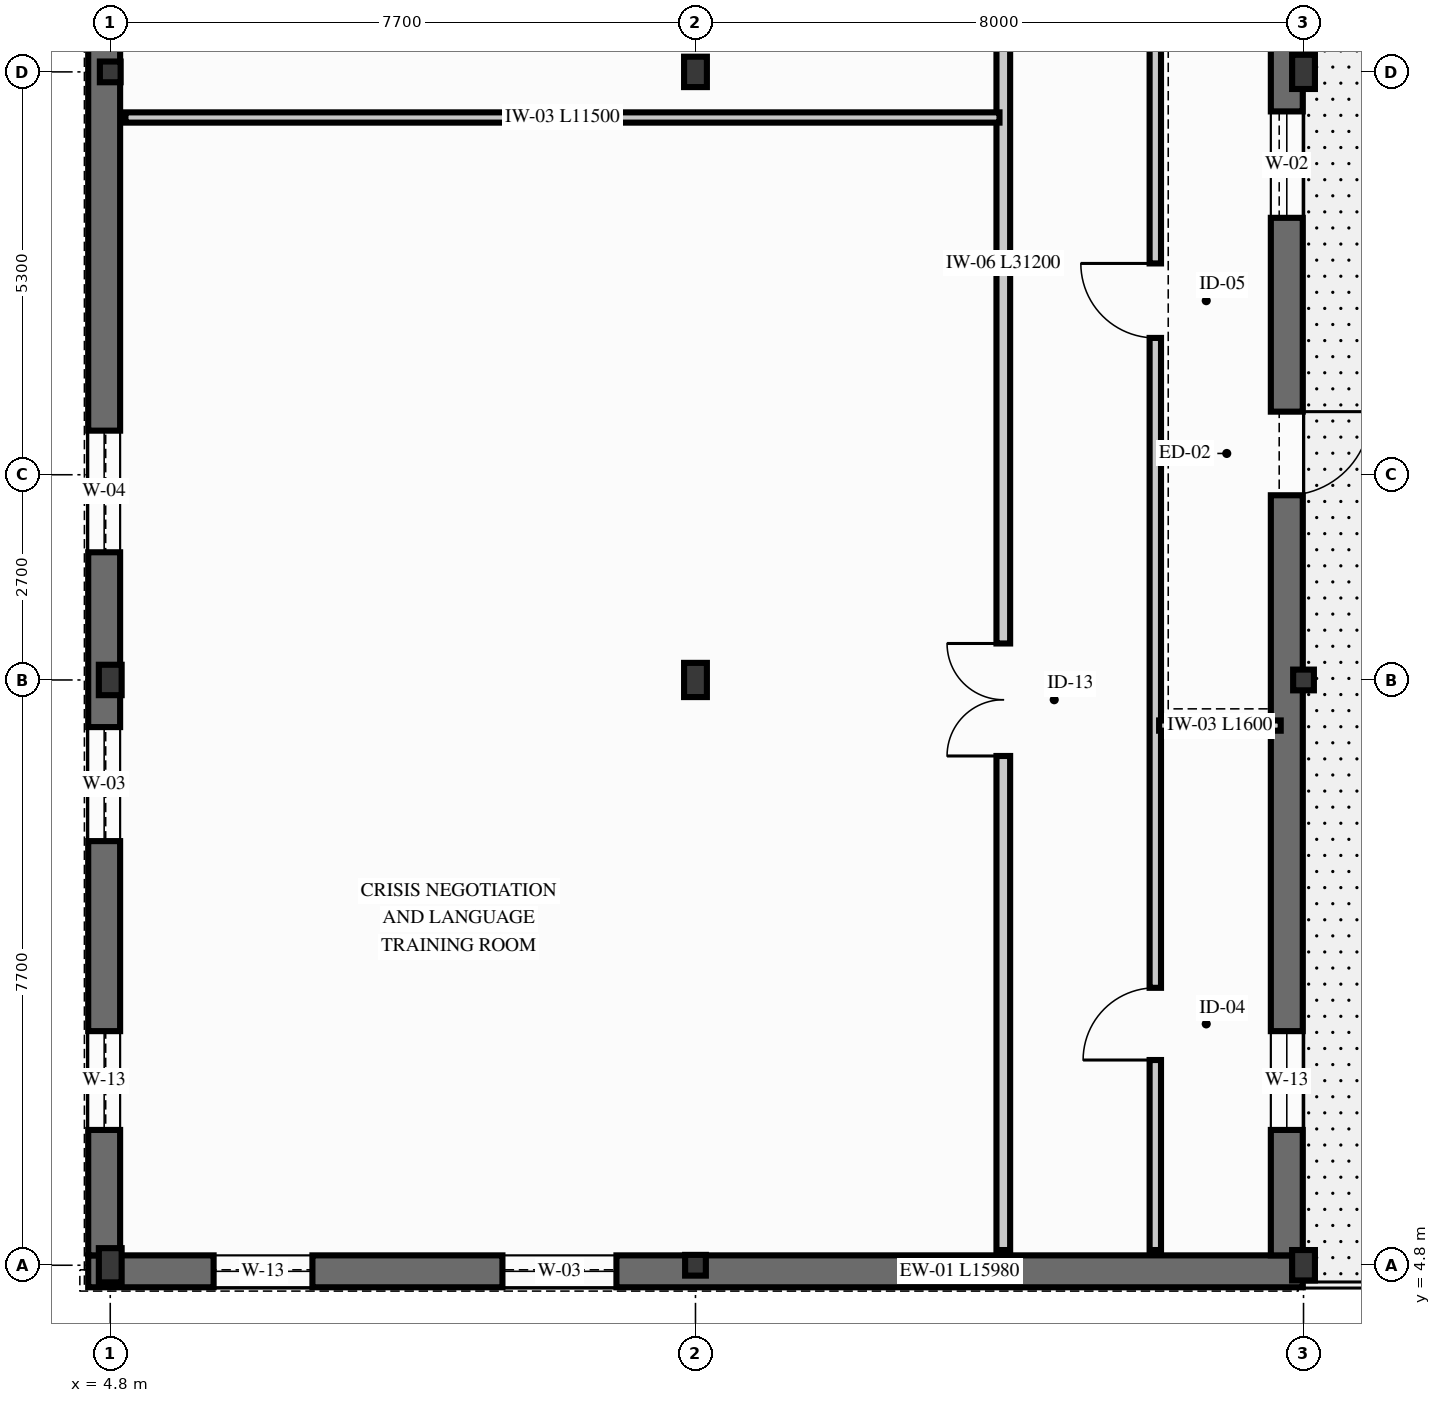
"""IFC4 building model, lengths in metres.
Left out: names, types, materials, properties, quantities, classifications, styles, units other than length and angle.
Written with IfcOpenShell. Run it as: python <this file> out.ifc"""

import sys

from ifc_helpers import new_model, si_unit, direction, frame, frame_2d, origin, origin_2d, place, context, subcontext, project, spatial, rectangle, hollow_circle, i_section, extrude, element, fill, save


model = new_model("IFC4")
c1 = context("Model", 3, precision=1e-05, world=origin(), true_north=direction((0.0, 1.0)))
c2 = subcontext(c1, "Body", "Model", "MODEL_VIEW")
j1 = project(units=[si_unit("LENGTHUNIT", "METRE"), si_unit("PLANEANGLEUNIT", "RADIAN")], contexts=[c1])
p1 = place(None, origin())
s1 = spatial("IfcSite", under=j1, at=p1, CompositionType="ELEMENT")
p2 = place(p1, origin())
s2 = spatial("IfcBuilding", under=s1, at=p2, CompositionType="ELEMENT")
p3 = place(p2, frame((0.0, 0.0, 13.5)))
s3 = spatial("IfcBuildingStorey", under=s2, at=p3, CompositionType="ELEMENT", Elevation=13.5)
p4 = place(p3, frame((4.8, 4.8, 0.0), z_axis=(0.0, 0.0, 1.0), x_axis=(1.0, 0.0, 0.0)))
e1 = element("IfcColumn", 1, at=p4, inside=s3, PredefinedType="COLUMN", context=c2, shape_type="SweptSolid", body=[
    extrude(i_section(OverallWidth=0.3, OverallDepth=0.45, WebThickness=0.014, FlangeThickness=0.026, FilletRadius=0.027, at=origin_2d()), origin(), (0.0, 0.0, 1.0), 3.94),
])
p5 = place(p3, frame((4.8, 12.5, 0.0), z_axis=(0.0, 0.0, 1.0), x_axis=(1.0, 0.0, 0.0)))
e2 = element("IfcColumn", 2, at=p5, inside=s3, PredefinedType="COLUMN", context=c2, shape_type="SweptSolid", body=[
    extrude(i_section(OverallWidth=0.3, OverallDepth=0.4, WebThickness=0.013, FlangeThickness=0.024, FilletRadius=0.027, at=origin_2d()), origin(), (0.0, 0.0, 1.0), 3.94),
])
for number, where, z_axis, x_axis in (
    (3, (4.8, 20.5, 0.0), (0.0, 0.0, 1.0), (1.0, 0.0, 0.0)),
    (4, (12.5, 4.8, 0.0), (0.0, 0.0, 1.0), (1.0, 0.0, 0.0)),
):
    element("IfcColumn", number, at=place(p3, frame(where, z_axis=z_axis, x_axis=x_axis)), inside=s3, PredefinedType="COLUMN", context=c2, shape_type="SweptSolid", body=[
        extrude(hollow_circle(Radius=0.136, WallThickness=0.012, at=origin_2d()), origin(), (0.0, 0.0, 1.0), 3.94),
    ])
p6 = place(p3, frame((12.5, 12.5, 0.0), z_axis=(0.0, 0.0, 1.0), x_axis=(1.0, 0.0, 0.0)))
e5 = element("IfcColumn", 5, at=p6, inside=s3, PredefinedType="COLUMN", context=c2, shape_type="SweptSolid", body=[
    extrude(i_section(OverallWidth=0.3, OverallDepth=0.45, WebThickness=0.014, FlangeThickness=0.026, FilletRadius=0.027, at=origin_2d()), origin(), (0.0, 0.0, 1.0), 3.94),
])
for number, where, z_axis, x_axis in (
    (6, (12.5, 20.5, 0.0), (0.0, 0.0, 1.0), (1.0, 0.0, 0.0)),
    (7, (20.5, 4.8, 0.0), (0.0, 0.0, 1.0), (1.0, 0.0, 0.0)),
):
    element("IfcColumn", number, at=place(p3, frame(where, z_axis=z_axis, x_axis=x_axis)), inside=s3, PredefinedType="COLUMN", context=c2, shape_type="SweptSolid", body=[
        extrude(i_section(OverallWidth=0.3, OverallDepth=0.4, WebThickness=0.013, FlangeThickness=0.024, FilletRadius=0.027, at=origin_2d()), origin(), (0.0, 0.0, 1.0), 3.94),
    ])
p7 = place(p3, frame((20.5, 12.5, 0.0), z_axis=(0.0, 0.0, 1.0), x_axis=(1.0, 0.0, 0.0)))
e8 = element("IfcColumn", 8, at=p7, inside=s3, PredefinedType="COLUMN", context=c2, shape_type="SweptSolid", body=[
    extrude(hollow_circle(Radius=0.136, WallThickness=0.012, at=origin_2d()), origin(), (0.0, 0.0, 1.0), 3.94),
])
p8 = place(p3, frame((20.5, 20.5, 0.0), z_axis=(0.0, 0.0, 1.0), x_axis=(1.0, 0.0, 0.0)))
e9 = element("IfcColumn", 9, at=p8, inside=s3, PredefinedType="COLUMN", context=c2, shape_type="SweptSolid", body=[
    extrude(i_section(OverallWidth=0.3, OverallDepth=0.45, WebThickness=0.014, FlangeThickness=0.026, FilletRadius=0.027, at=origin_2d()), origin(), (0.0, 0.0, 1.0), 3.94),
])
p9 = place(p3, frame((4.51, 4.72, 0.0), z_axis=(0.0, 0.0, 1.0), x_axis=(1.0, 0.0, 0.0)))
e10 = element("IfcWall", 10, at=p9, inside=s3, PredefinedType="SOLIDWALL", context=c2, shape_type="SweptSolid", body=[
    extrude(rectangle(XDim=15.98, YDim=0.42, at=frame_2d((7.99, 0.0))), origin(), (0.0, 0.0, 1.0), 3.9),
])
p10 = place(p9, frame((1.65, 0.0, 0.85)))
e11 = element("IfcOpeningElement", 11, at=p10, cuts=e10, PredefinedType="OPENING", context=c2, shape_type="SweptSolid", body=[
    extrude(rectangle(XDim=1.3, YDim=2.15, at=frame_2d((0.65, 1.075))), frame((0.0, 0.22, 0.0), z_axis=(0.0, -1.0, 0.0), x_axis=(1.0, 0.0, 0.0)), (0.0, 0.0, 1.0), 0.44),
])
p11 = place(p9, frame((5.45, 0.0, 0.85)))
e12 = element("IfcOpeningElement", 12, at=p11, cuts=e10, PredefinedType="OPENING", context=c2, shape_type="SweptSolid", body=[
    extrude(rectangle(XDim=1.5, YDim=2.3, at=frame_2d((0.75, 1.15))), frame((0.0, 0.22, 0.0), z_axis=(0.0, -1.0, 0.0), x_axis=(1.0, 0.0, 0.0)), (0.0, 0.0, 1.0), 0.44),
])
p12 = place(p3, frame((4.72, 4.93, 0.0), z_axis=(0.0, 0.0, 1.0), x_axis=(0.0, 1.0, 0.0)))
e13 = element("IfcWall", 13, at=p12, inside=s3, PredefinedType="SOLIDWALL", context=c2, shape_type="SweptSolid", body=[
    extrude(rectangle(XDim=31.57, YDim=0.42, at=frame_2d((15.785, 0.0))), origin(), (0.0, 0.0, 1.0), 3.9),
])
p13 = place(p12, frame((1.65, 0.0, 0.85)))
e14 = element("IfcOpeningElement", 14, at=p13, cuts=e13, PredefinedType="OPENING", context=c2, shape_type="SweptSolid", body=[
    extrude(rectangle(XDim=1.3, YDim=2.15, at=frame_2d((0.65, 1.075))), frame((0.0, 0.22, 0.0), z_axis=(0.0, -1.0, 0.0), x_axis=(1.0, 0.0, 0.0)), (0.0, 0.0, 1.0), 0.44),
])
p14 = place(p12, frame((5.45, 0.0, 0.85)))
e15 = element("IfcOpeningElement", 15, at=p14, cuts=e13, PredefinedType="OPENING", context=c2, shape_type="SweptSolid", body=[
    extrude(rectangle(XDim=1.5, YDim=2.3, at=frame_2d((0.75, 1.15))), frame((0.0, 0.22, 0.0), z_axis=(0.0, -1.0, 0.0), x_axis=(1.0, 0.0, 0.0)), (0.0, 0.0, 1.0), 0.44),
])
p15 = place(p12, frame((9.25, 0.0, 0.85)))
e16 = element("IfcOpeningElement", 16, at=p15, cuts=e13, PredefinedType="OPENING", context=c2, shape_type="SweptSolid", body=[
    extrude(rectangle(XDim=1.6, YDim=2.4, at=frame_2d((0.8, 1.2))), frame((0.0, 0.22, 0.0), z_axis=(0.0, -1.0, 0.0), x_axis=(1.0, 0.0, 0.0)), (0.0, 0.0, 1.0), 0.44),
])
p16 = place(p12, frame((16.85, 0.0, 0.85)))
e17 = element("IfcOpeningElement", 17, at=p16, cuts=e13, PredefinedType="OPENING", context=c2, shape_type="SweptSolid", body=[
    extrude(rectangle(XDim=1.7, YDim=2.35, at=frame_2d((0.85, 1.175))), frame((0.0, 0.22, 0.0), z_axis=(0.0, -1.0, 0.0), x_axis=(1.0, 0.0, 0.0)), (0.0, 0.0, 1.0), 0.44),
])
p17 = place(p12, frame((20.65, 0.0, 0.85)))
e18 = element("IfcOpeningElement", 18, at=p17, cuts=e13, PredefinedType="OPENING", context=c2, shape_type="SweptSolid", body=[
    extrude(rectangle(XDim=1.8, YDim=2.4, at=frame_2d((0.9, 1.2))), frame((0.0, 0.22, 0.0), z_axis=(0.0, -1.0, 0.0), x_axis=(1.0, 0.0, 0.0)), (0.0, 0.0, 1.0), 0.44),
])
p18 = place(p3, frame((20.28, 4.93, 0.0), z_axis=(0.0, 0.0, 1.0), x_axis=(0.0, 1.0, 0.0)))
e19 = element("IfcWall", 19, at=p18, inside=s3, PredefinedType="SOLIDWALL", context=c2, shape_type="SweptSolid", body=[
    extrude(rectangle(XDim=31.57, YDim=0.42, at=frame_2d((15.785, 0.0))), origin(), (0.0, 0.0, 1.0), 3.9),
])
p19 = place(p18, frame((11.1, 0.0, 0.0), z_axis=(0.0, 0.0, 1.0), x_axis=(-1.0, 0.0, 0.0)))
e20 = element("IfcOpeningElement", 20, at=p19, cuts=e19, PredefinedType="OPENING", context=c2, shape_type="SweptSolid", body=[
    extrude(rectangle(XDim=1.1, YDim=2.25, at=frame_2d((0.55, 1.125))), frame((0.0, 0.22, 0.0), z_axis=(0.0, -1.0, 0.0), x_axis=(1.0, 0.0, 0.0)), (0.0, 0.0, 1.0), 0.44),
])
p20 = place(p18, frame((21.1, 0.0, 0.0), z_axis=(0.0, 0.0, 1.0), x_axis=(-1.0, 0.0, 0.0)))
e21 = element("IfcOpeningElement", 21, at=p20, cuts=e19, PredefinedType="OPENING", context=c2, shape_type="SweptSolid", body=[
    extrude(rectangle(XDim=1.1, YDim=2.25, at=frame_2d((0.55, 1.125))), frame((0.0, 0.22, 0.0), z_axis=(0.0, -1.0, 0.0), x_axis=(1.0, 0.0, 0.0)), (0.0, 0.0, 1.0), 0.44),
])
p21 = place(p18, frame((1.65, 0.0, 0.85)))
e22 = element("IfcOpeningElement", 22, at=p21, cuts=e19, PredefinedType="OPENING", context=c2, shape_type="SweptSolid", body=[
    extrude(rectangle(XDim=1.3, YDim=2.15, at=frame_2d((0.65, 1.075))), frame((0.0, 0.22, 0.0), z_axis=(0.0, -1.0, 0.0), x_axis=(1.0, 0.0, 0.0)), (0.0, 0.0, 1.0), 0.44),
])
p22 = place(p18, frame((13.65, 0.0, 0.85)))
e23 = element("IfcOpeningElement", 23, at=p22, cuts=e19, PredefinedType="OPENING", context=c2, shape_type="SweptSolid", body=[
    extrude(rectangle(XDim=1.4, YDim=2.2, at=frame_2d((0.7, 1.1))), frame((0.0, 0.22, 0.0), z_axis=(0.0, -1.0, 0.0), x_axis=(1.0, 0.0, 0.0)), (0.0, 0.0, 1.0), 0.44),
])
p23 = place(p3, frame((16.55, 5.0, 0.0), z_axis=(0.0, 0.0, 1.0), x_axis=(0.0, 1.0, 0.0)))
e24 = element("IfcWall", 24, at=p23, inside=s3, PredefinedType="PARTITIONING", context=c2, shape_type="SweptSolid", body=[
    extrude(rectangle(XDim=31.2, YDim=0.18, at=frame_2d((15.6, 0.0))), origin(), (0.0, 0.0, 1.0), 3.478),
])
p24 = place(p23, frame((6.5, 0.0, 0.0)))
e25 = element("IfcOpeningElement", 25, at=p24, cuts=e24, PredefinedType="OPENING", context=c2, shape_type="SweptSolid", body=[
    extrude(rectangle(XDim=1.48, YDim=2.28, at=frame_2d((0.74, 1.14))), frame((0.0, 0.1, 0.0), z_axis=(0.0, -1.0, 0.0), x_axis=(1.0, 0.0, 0.0)), (0.0, 0.0, 1.0), 0.2),
])
p25 = place(p23, frame((18.0, 0.0, 0.0)))
e26 = element("IfcOpeningElement", 26, at=p25, cuts=e24, PredefinedType="OPENING", context=c2, shape_type="SweptSolid", body=[
    extrude(rectangle(XDim=0.92, YDim=2.12, at=frame_2d((0.46, 1.06))), frame((0.0, 0.1, 0.0), z_axis=(0.0, -1.0, 0.0), x_axis=(1.0, 0.0, 0.0)), (0.0, 0.0, 1.0), 0.2),
])
p26 = place(p23, frame((26.3, 0.0, 0.0)))
e27 = element("IfcOpeningElement", 27, at=p26, cuts=e24, PredefinedType="OPENING", context=c2, shape_type="SweptSolid", body=[
    extrude(rectangle(XDim=1.15, YDim=2.2, at=frame_2d((0.575, 1.1))), frame((0.0, 0.1, 0.0), z_axis=(0.0, -1.0, 0.0), x_axis=(1.0, 0.0, 0.0)), (0.0, 0.0, 1.0), 0.2),
])
p27 = place(p3, frame((18.55, 5.0, 0.0), z_axis=(0.0, 0.0, 1.0), x_axis=(0.0, 1.0, 0.0)))
e28 = element("IfcWall", 28, at=p27, inside=s3, PredefinedType="PARTITIONING", context=c2, shape_type="SweptSolid", body=[
    extrude(rectangle(XDim=27.9, YDim=0.15, at=frame_2d((13.95, 0.0))), origin(), (0.0, 0.0, 1.0), 3.98),
])
p28 = place(p27, frame((2.5, 0.0, 0.0)))
e29 = element("IfcOpeningElement", 29, at=p28, cuts=e28, PredefinedType="OPENING", context=c2, shape_type="SweptSolid", body=[
    extrude(rectangle(XDim=0.95, YDim=2.15, at=frame_2d((0.475, 1.075))), frame((0.0, 0.085, 0.0), z_axis=(0.0, -1.0, 0.0), x_axis=(1.0, 0.0, 0.0)), (0.0, 0.0, 1.0), 0.17),
])
p29 = place(p27, frame((12.0, 0.0, 0.0)))
e30 = element("IfcOpeningElement", 30, at=p29, cuts=e28, PredefinedType="OPENING", context=c2, shape_type="SweptSolid", body=[
    extrude(rectangle(XDim=0.98, YDim=2.16, at=frame_2d((0.49, 1.08))), frame((0.0, 0.085, 0.0), z_axis=(0.0, -1.0, 0.0), x_axis=(1.0, 0.0, 0.0)), (0.0, 0.0, 1.0), 0.17),
])
p30 = place(p3, frame((5.0, 19.9, 0.0), z_axis=(0.0, 0.0, 1.0), x_axis=(1.0, 0.0, 0.0)))
e31 = element("IfcWall", 31, at=p30, inside=s3, PredefinedType="PARTITIONING", context=c2, shape_type="SweptSolid", body=[
    extrude(rectangle(XDim=11.5, YDim=0.135, at=frame_2d((5.75, 0.0))), origin(), (0.0, 0.0, 1.0), 3.378),
])
p31 = place(p3, frame((18.6, 11.9, 0.0), z_axis=(0.0, 0.0, 1.0), x_axis=(1.0, 0.0, 0.0)))
e32 = element("IfcWall", 32, at=p31, inside=s3, PredefinedType="PARTITIONING", context=c2, shape_type="SweptSolid", body=[
    extrude(rectangle(XDim=1.6, YDim=0.135, at=frame_2d((0.8, 0.0))), origin(), (0.0, 0.0, 1.0), 3.98),
])
p32 = place(p19, origin())
e33 = element("IfcDoor", 33, at=p32, inside=s3, OperationType="SINGLE_SWING_LEFT", PredefinedType="DOOR", context=c2, shape_type="SweptSolid", body=[
    extrude(rectangle(XDim=1.1, YDim=2.25, at=frame_2d((0.55, 1.125))), frame((0.0, 0.025, 0.0), z_axis=(0.0, -1.0, 0.0), x_axis=(1.0, 0.0, 0.0)), (0.0, 0.0, 1.0), 0.05),
])
fill(e20, e33)
p33 = place(p10, origin())
e34 = element("IfcWindow", 34, at=p33, inside=s3, PartitioningType="SINGLE_PANEL", PredefinedType="WINDOW", context=c2, shape_type="SweptSolid", body=[
    extrude(rectangle(XDim=1.3, YDim=2.15, at=frame_2d((0.65, 1.075))), frame((0.0, 0.03, 0.0), z_axis=(0.0, -1.0, 0.0), x_axis=(1.0, 0.0, 0.0)), (0.0, 0.0, 1.0), 0.06),
])
fill(e11, e34)
p34 = place(p11, origin())
e35 = element("IfcWindow", 35, at=p34, inside=s3, PartitioningType="SINGLE_PANEL", PredefinedType="WINDOW", context=c2, shape_type="SweptSolid", body=[
    extrude(rectangle(XDim=1.5, YDim=2.3, at=frame_2d((0.75, 1.15))), frame((0.0, 0.03, 0.0), z_axis=(0.0, -1.0, 0.0), x_axis=(1.0, 0.0, 0.0)), (0.0, 0.0, 1.0), 0.06),
])
fill(e12, e35)
p35 = place(p13, origin())
e36 = element("IfcWindow", 36, at=p35, inside=s3, PartitioningType="SINGLE_PANEL", PredefinedType="WINDOW", context=c2, shape_type="SweptSolid", body=[
    extrude(rectangle(XDim=1.3, YDim=2.15, at=frame_2d((0.65, 1.075))), frame((0.0, 0.03, 0.0), z_axis=(0.0, -1.0, 0.0), x_axis=(1.0, 0.0, 0.0)), (0.0, 0.0, 1.0), 0.06),
])
fill(e14, e36)
p36 = place(p14, origin())
e37 = element("IfcWindow", 37, at=p36, inside=s3, PartitioningType="SINGLE_PANEL", PredefinedType="WINDOW", context=c2, shape_type="SweptSolid", body=[
    extrude(rectangle(XDim=1.5, YDim=2.3, at=frame_2d((0.75, 1.15))), frame((0.0, 0.03, 0.0), z_axis=(0.0, -1.0, 0.0), x_axis=(1.0, 0.0, 0.0)), (0.0, 0.0, 1.0), 0.06),
])
fill(e15, e37)
p37 = place(p15, origin())
e38 = element("IfcWindow", 38, at=p37, inside=s3, PartitioningType="SINGLE_PANEL", PredefinedType="WINDOW", context=c2, shape_type="SweptSolid", body=[
    extrude(rectangle(XDim=1.6, YDim=2.4, at=frame_2d((0.8, 1.2))), frame((0.0, 0.03, 0.0), z_axis=(0.0, -1.0, 0.0), x_axis=(1.0, 0.0, 0.0)), (0.0, 0.0, 1.0), 0.06),
])
fill(e16, e38)
p38 = place(p21, origin())
e39 = element("IfcWindow", 39, at=p38, inside=s3, PartitioningType="SINGLE_PANEL", PredefinedType="WINDOW", context=c2, shape_type="SweptSolid", body=[
    extrude(rectangle(XDim=1.3, YDim=2.15, at=frame_2d((0.65, 1.075))), frame((0.0, 0.03, 0.0), z_axis=(0.0, -1.0, 0.0), x_axis=(1.0, 0.0, 0.0)), (0.0, 0.0, 1.0), 0.06),
])
fill(e22, e39)
p39 = place(p22, origin())
e40 = element("IfcWindow", 40, at=p39, inside=s3, PartitioningType="SINGLE_PANEL", PredefinedType="WINDOW", context=c2, shape_type="SweptSolid", body=[
    extrude(rectangle(XDim=1.4, YDim=2.2, at=frame_2d((0.7, 1.1))), frame((0.0, 0.03, 0.0), z_axis=(0.0, -1.0, 0.0), x_axis=(1.0, 0.0, 0.0)), (0.0, 0.0, 1.0), 0.06),
])
fill(e23, e40)
p40 = place(p3, frame((12.344, 11.705, 6.319), z_axis=(-0.281250993097, 0.0, 0.959634242241), x_axis=(-0.726259822262, -0.653636100345, -0.212853280204)))
p41 = place(p40, frame((-2.717, -9.274, 0.0)))
p42 = place(p41, frame((0.0, 0.0, 0.02)))
e41 = element("IfcWindow", 41, at=p42, inside=s3, PartitioningType="SINGLE_PANEL", PredefinedType="SKYLIGHT", context=c2, shape_type="SweptSolid", body=[
    extrude(rectangle(XDim=1.8, YDim=2.2, at=origin_2d()), origin(), (0.0, 0.0, 1.0), 0.08),
])
p43 = place(p3, frame((12.556, 29.195, 6.319), z_axis=(0.281259054176, 0.0, 0.959631879652), x_axis=(0.726249140985, 0.653646830346, -0.212856774375)))
p44 = place(p43, frame((-2.573, -9.267, 0.0)))
p45 = place(p44, frame((0.0, 0.0, 0.02)))
e42 = element("IfcWindow", 42, at=p45, inside=s3, PartitioningType="SINGLE_PANEL", PredefinedType="SKYLIGHT", context=c2, shape_type="SweptSolid", body=[
    extrude(rectangle(XDim=2.0, YDim=2.4, at=origin_2d()), origin(), (0.0, 0.0, 1.0), 0.08),
])
p46 = place(p24, origin())
e43 = element("IfcDoor", 43, at=p46, inside=s3, OperationType="DOUBLE_DOOR_SINGLE_SWING", PredefinedType="DOOR", context=c2, shape_type="SweptSolid", body=[
    extrude(rectangle(XDim=1.48, YDim=2.28, at=frame_2d((0.74, 1.14))), frame((0.0, 0.025, 0.0), z_axis=(0.0, -1.0, 0.0), x_axis=(1.0, 0.0, 0.0)), (0.0, 0.0, 1.0), 0.05),
])
fill(e25, e43)
p47 = place(p28, origin())
e44 = element("IfcDoor", 44, at=p47, inside=s3, OperationType="SINGLE_SWING_LEFT", PredefinedType="DOOR", context=c2, shape_type="SweptSolid", body=[
    extrude(rectangle(XDim=0.95, YDim=2.15, at=frame_2d((0.475, 1.075))), frame((0.0, 0.025, 0.0), z_axis=(0.0, -1.0, 0.0), x_axis=(1.0, 0.0, 0.0)), (0.0, 0.0, 1.0), 0.05),
])
fill(e29, e44)
p48 = place(p29, origin())
e45 = element("IfcDoor", 45, at=p48, inside=s3, OperationType="SINGLE_SWING_RIGHT", PredefinedType="DOOR", context=c2, shape_type="SweptSolid", body=[
    extrude(rectangle(XDim=0.98, YDim=2.16, at=frame_2d((0.49, 1.08))), frame((0.0, 0.025, 0.0), z_axis=(0.0, -1.0, 0.0), x_axis=(1.0, 0.0, 0.0)), (0.0, 0.0, 1.0), 0.05),
])
fill(e30, e45)
save(model, sys.argv[1])
